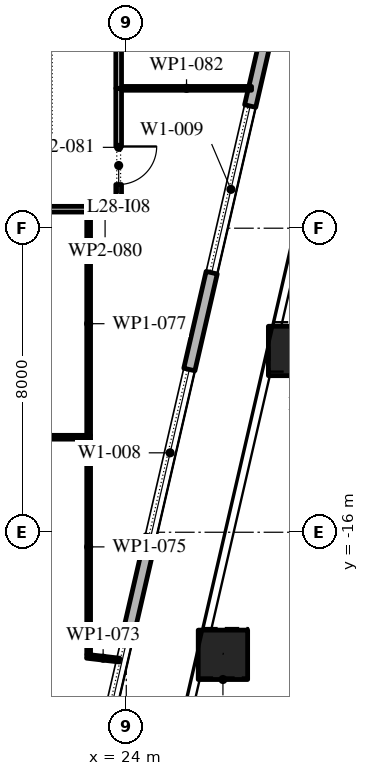
"""IFC4 building model, lengths in metres.
Left out: names, types, materials, properties, quantities, classifications, styles, units other than length and angle.
Written with IfcOpenShell. Run it as: python <this file> out.ifc"""

import sys

from ifc_helpers import new_model, si_unit, direction, frame, frame_2d, origin, origin_2d, place, context, subcontext, project, spatial, rectangle, extrude, element, fill, save


model = new_model("IFC4")
c1 = context("Model", 3, precision=1e-05, world=origin(), true_north=direction((0.0, 1.0)))
c2 = subcontext(c1, "Body", "Model", "MODEL_VIEW")
j1 = project(units=[si_unit("LENGTHUNIT", "METRE"), si_unit("PLANEANGLEUNIT", "RADIAN")], contexts=[c1])
p1 = place(None, origin())
s1 = spatial("IfcSite", under=j1, at=p1, CompositionType="ELEMENT")
p2 = place(p1, origin())
s2 = spatial("IfcBuilding", under=s1, at=p2, CompositionType="ELEMENT")
p3 = place(p2, frame((0.0, 0.0, 130.8)))
s3 = spatial("IfcBuildingStorey", under=s2, at=p3, CompositionType="ELEMENT", Elevation=130.8)
p4 = place(p3, frame((26.543, -19.225, 0.0), z_axis=(0.002906226325, 0.012613022249, 0.99991622925), x_axis=(-0.974466825284, 0.224531526563, 0.0)))
e1 = element("IfcColumn", 1, at=p4, inside=s3, PredefinedType="COLUMN", context=c2, shape_type="SweptSolid", body=[
    extrude(rectangle(XDim=1.3, YDim=1.3, at=origin_2d()), origin(), (0.0, 0.0, 1.0), 4.2),
])
p5 = place(p3, frame((28.389, -11.23, 0.0), z_axis=(0.005869083212, 0.025335844359, 0.999661767226), x_axis=(-0.974202561131, 0.225675363932, 0.0)))
e2 = element("IfcColumn", 2, at=p5, inside=s3, PredefinedType="COLUMN", context=c2, shape_type="SweptSolid", body=[
    extrude(rectangle(XDim=1.3, YDim=1.3, at=origin_2d()), origin(), (0.0, 0.0, 1.0), 4.201),
])
p6 = place(p3, frame((22.82, -24.016, 0.0), z_axis=(0.0, 0.0, 1.0), x_axis=(0.224953880882, 0.974369412223, 0.0)))
e3 = element("IfcWall", 3, at=p6, inside=s3, PredefinedType="STANDARD", context=c2, shape_type="SweptSolid", body=[
    extrude(rectangle(XDim=49.5, YDim=0.3, at=frame_2d((24.75, 0.0))), origin(), (0.0, 0.0, 1.0), 4.0),
])
p7 = place(p6, frame((1.157, 0.0, 0.45)))
e4 = element("IfcOpeningElement", 4, at=p7, cuts=e3, PredefinedType="OPENING", context=c2, shape_type="SweptSolid", body=[
    extrude(rectangle(XDim=4.5, YDim=3.05, at=frame_2d((2.25, 1.525))), frame((0.0, 0.16, 0.0), z_axis=(0.0, -1.0, 0.0), x_axis=(1.0, 0.0, 0.0)), (0.0, 0.0, 1.0), 0.32),
])
p8 = place(p6, frame((8.121, 0.0, 0.45)))
e5 = element("IfcOpeningElement", 5, at=p8, cuts=e3, PredefinedType="OPENING", context=c2, shape_type="SweptSolid", body=[
    extrude(rectangle(XDim=4.5, YDim=3.05, at=frame_2d((2.25, 1.525))), frame((0.0, 0.16, 0.0), z_axis=(0.0, -1.0, 0.0), x_axis=(1.0, 0.0, 0.0)), (0.0, 0.0, 1.0), 0.32),
])
p9 = place(p6, frame((15.236, 0.0, 0.45)))
e6 = element("IfcOpeningElement", 6, at=p9, cuts=e3, PredefinedType="OPENING", context=c2, shape_type="SweptSolid", body=[
    extrude(rectangle(XDim=4.5, YDim=3.05, at=frame_2d((2.25, 1.525))), frame((0.0, 0.16, 0.0), z_axis=(0.0, -1.0, 0.0), x_axis=(1.0, 0.0, 0.0)), (0.0, 0.0, 1.0), 0.32),
])
p10 = place(p6, frame((23.4, 0.0, 0.0)))
e7 = element("IfcOpeningElement", 7, at=p10, cuts=e3, PredefinedType="OPENING", context=c2, shape_type="SweptSolid", body=[
    extrude(rectangle(XDim=2.4, YDim=3.5, at=frame_2d((1.2, 1.75))), frame((0.0, 0.16, 0.0), z_axis=(0.0, -1.0, 0.0), x_axis=(1.0, 0.0, 0.0)), (0.0, 0.0, 1.0), 0.32),
])
p11 = place(p6, frame((29.464, 0.0, 0.45)))
e8 = element("IfcOpeningElement", 8, at=p11, cuts=e3, PredefinedType="OPENING", context=c2, shape_type="SweptSolid", body=[
    extrude(rectangle(XDim=4.5, YDim=2.875, at=frame_2d((2.25, 1.438))), frame((0.0, 0.16, 0.0), z_axis=(0.0, -1.0, 0.0), x_axis=(1.0, 0.0, 0.0)), (0.0, 0.0, 1.0), 0.32),
])
p12 = place(p6, frame((36.579, 0.0, 0.45)))
e9 = element("IfcOpeningElement", 9, at=p12, cuts=e3, PredefinedType="OPENING", context=c2, shape_type="SweptSolid", body=[
    extrude(rectangle(XDim=4.5, YDim=2.825, at=frame_2d((2.25, 1.413))), frame((0.0, 0.16, 0.0), z_axis=(0.0, -1.0, 0.0), x_axis=(1.0, 0.0, 0.0)), (0.0, 0.0, 1.0), 0.32),
])
p13 = place(p6, frame((43.693, 0.0, 0.45)))
e10 = element("IfcOpeningElement", 10, at=p13, cuts=e3, PredefinedType="OPENING", context=c2, shape_type="SweptSolid", body=[
    extrude(rectangle(XDim=4.5, YDim=2.75, at=frame_2d((2.25, 1.375))), frame((0.0, 0.16, 0.0), z_axis=(0.0, -1.0, 0.0), x_axis=(1.0, 0.0, 0.0)), (0.0, 0.0, 1.0), 0.32),
])
p14 = place(p3, frame((22.96, -19.264, 0.0), z_axis=(0.0, 0.0, 1.0), x_axis=(0.993326131588, -0.115339482852, 0.0)))
e11 = element("IfcWall", 11, at=p14, inside=s3, PredefinedType="PARTITIONING", context=c2, shape_type="SweptSolid", body=[
    extrude(rectangle(XDim=0.868, YDim=0.1, at=frame_2d((0.434, 0.0))), origin(), (0.0, 0.0, 1.0), 4.0),
])
p15 = place(p3, frame((23.06, -13.5, 0.0), z_axis=(0.0, 0.0, 1.0), x_axis=(-1.0, 0.0, 0.0)))
e12 = element("IfcWall", 12, at=p15, inside=s3, PredefinedType="PARTITIONING", context=c2, shape_type="SweptSolid", body=[
    extrude(rectangle(XDim=8.34, YDim=0.1, at=frame_2d((4.17, 0.0))), origin(), (0.0, 0.0, 1.0), 4.0),
])
p16 = place(p15, frame((2.04, 0.0, 0.0)))
e13 = element("IfcOpeningElement", 13, at=p16, cuts=e12, PredefinedType="OPENING", context=c2, shape_type="SweptSolid", body=[
    extrude(rectangle(XDim=0.9, YDim=2.1, at=frame_2d((0.45, 1.05))), frame((0.0, 0.06, 0.0), z_axis=(0.0, -1.0, 0.0), x_axis=(1.0, 0.0, 0.0)), (0.0, 0.0, 1.0), 0.12),
])
p17 = place(p3, frame((23.01, -13.55, 0.0), z_axis=(0.0, 0.0, 1.0), x_axis=(0.0, -1.0, 0.0)))
e14 = element("IfcWall", 14, at=p17, inside=s3, PredefinedType="PARTITIONING", context=c2, shape_type="SweptSolid", body=[
    extrude(rectangle(XDim=5.67, YDim=0.1, at=frame_2d((2.835, 0.0))), origin(), (0.0, 0.0, 1.0), 4.0),
])
p18 = place(p3, frame((23.06, -7.5, 0.0), z_axis=(0.0, 0.0, 1.0), x_axis=(-1.0, 0.0, 0.0)))
e15 = element("IfcWall", 15, at=p18, inside=s3, PredefinedType="PARTITIONING", context=c2, shape_type="SweptSolid", body=[
    extrude(rectangle(XDim=8.39, YDim=0.15, at=frame_2d((4.195, 0.0))), origin(), (0.0, 0.0, 1.0), 4.0),
])
p19 = place(p18, frame((1.99, 0.0, 0.0)))
e16 = element("IfcOpeningElement", 16, at=p19, cuts=e15, PredefinedType="OPENING", context=c2, shape_type="SweptSolid", body=[
    extrude(rectangle(XDim=1.0, YDim=2.1, at=frame_2d((0.5, 1.05))), frame((0.0, 0.085, 0.0), z_axis=(0.0, -1.0, 0.0), x_axis=(1.0, 0.0, 0.0)), (0.0, 0.0, 1.0), 0.17),
])
p20 = place(p3, frame((23.01, -7.575, 0.0), z_axis=(0.0, 0.0, 1.0), x_axis=(0.0, -1.0, 0.0)))
e17 = element("IfcWall", 17, at=p20, inside=s3, PredefinedType="PARTITIONING", context=c2, shape_type="SweptSolid", body=[
    extrude(rectangle(XDim=5.875, YDim=0.1, at=frame_2d((2.938, 0.0))), origin(), (0.0, 0.0, 1.0), 4.0),
])
p21 = place(p3, frame((23.875, -7.5, 0.0), z_axis=(0.0, 0.0, 1.0), x_axis=(-1.0, 0.0, 0.0)))
e18 = element("IfcWall", 18, at=p21, inside=s3, PredefinedType="PARTITIONING", context=c2, shape_type="SweptSolid", body=[
    extrude(rectangle(XDim=0.865, YDim=0.15, at=frame_2d((0.433, 0.0))), origin(), (0.0, 0.0, 1.0), 4.0),
])
p22 = place(p3, frame((23.8, -4.32, 0.0), z_axis=(0.0, 0.0, 1.0), x_axis=(0.0, -1.0, 0.0)))
e19 = element("IfcWall", 19, at=p22, inside=s3, PredefinedType="PARTITIONING", context=c2, shape_type="SweptSolid", body=[
    extrude(rectangle(XDim=3.105, YDim=0.15, at=frame_2d((1.552, 0.0))), origin(), (0.0, 0.0, 1.0), 4.0),
])
p23 = place(p22, frame((1.53, 0.0, 0.0)))
e20 = element("IfcOpeningElement", 20, at=p23, cuts=e19, PredefinedType="OPENING", context=c2, shape_type="SweptSolid", body=[
    extrude(rectangle(XDim=1.0, YDim=2.1, at=frame_2d((0.5, 1.05))), frame((0.0, 0.085, 0.0), z_axis=(0.0, -1.0, 0.0), x_axis=(1.0, 0.0, 0.0)), (0.0, 0.0, 1.0), 0.17),
])
p24 = place(p3, frame((23.875, -4.32, 0.0), z_axis=(0.0, 0.0, 1.0), x_axis=(1.0, 0.0, 0.0)))
e21 = element("IfcWall", 21, at=p24, inside=s3, PredefinedType="PARTITIONING", context=c2, shape_type="SweptSolid", body=[
    extrude(rectangle(XDim=3.421, YDim=0.1, at=frame_2d((1.71, 0.0))), origin(), (0.0, 0.0, 1.0), 4.0),
])
p25 = place(p3, frame((23.8, 10.44, 0.0), z_axis=(0.0, 0.0, 1.0), x_axis=(0.0, -1.0, 0.0)))
e22 = element("IfcWall", 22, at=p25, inside=s3, PredefinedType="PARTITIONING", context=c2, shape_type="SweptSolid", body=[
    extrude(rectangle(XDim=14.76, YDim=0.15, at=frame_2d((7.38, 0.0))), origin(), (0.0, 0.0, 1.0), 4.0),
])
p26 = place(p25, frame((9.86, 0.0, 0.0)))
e23 = element("IfcOpeningElement", 23, at=p26, cuts=e22, PredefinedType="OPENING", context=c2, shape_type="SweptSolid", body=[
    extrude(rectangle(XDim=1.0, YDim=2.1, at=frame_2d((0.5, 1.05))), frame((0.0, 0.085, 0.0), z_axis=(0.0, -1.0, 0.0), x_axis=(1.0, 0.0, 0.0)), (0.0, 0.0, 1.0), 0.17),
])
p27 = place(p7, origin())
e24 = element("IfcWindow", 24, at=p27, inside=s3, PartitioningType="DOUBLE_PANEL_VERTICAL", PredefinedType="WINDOW", context=c2, shape_type="SweptSolid", body=[
    extrude(rectangle(XDim=4.5, YDim=3.05, at=frame_2d((2.25, 1.525))), frame((0.0, 0.03, 0.0), z_axis=(0.0, -1.0, 0.0), x_axis=(1.0, 0.0, 0.0)), (0.0, 0.0, 1.0), 0.06),
])
fill(e4, e24)
p28 = place(p8, origin())
e25 = element("IfcWindow", 25, at=p28, inside=s3, PartitioningType="DOUBLE_PANEL_VERTICAL", PredefinedType="WINDOW", context=c2, shape_type="SweptSolid", body=[
    extrude(rectangle(XDim=4.5, YDim=3.05, at=frame_2d((2.25, 1.525))), frame((0.0, 0.03, 0.0), z_axis=(0.0, -1.0, 0.0), x_axis=(1.0, 0.0, 0.0)), (0.0, 0.0, 1.0), 0.06),
])
fill(e5, e25)
p29 = place(p9, origin())
e26 = element("IfcWindow", 26, at=p29, inside=s3, PartitioningType="DOUBLE_PANEL_VERTICAL", PredefinedType="WINDOW", context=c2, shape_type="SweptSolid", body=[
    extrude(rectangle(XDim=4.5, YDim=3.05, at=frame_2d((2.25, 1.525))), frame((0.0, 0.03, 0.0), z_axis=(0.0, -1.0, 0.0), x_axis=(1.0, 0.0, 0.0)), (0.0, 0.0, 1.0), 0.06),
])
fill(e6, e26)
p30 = place(p23, origin())
e27 = element("IfcDoor", 27, at=p30, inside=s3, OperationType="SINGLE_SWING_RIGHT", PredefinedType="DOOR", context=c2, shape_type="SweptSolid", body=[
    extrude(rectangle(XDim=1.0, YDim=2.1, at=frame_2d((0.5, 1.05))), frame((0.0, 0.025, 0.0), z_axis=(0.0, -1.0, 0.0), x_axis=(1.0, 0.0, 0.0)), (0.0, 0.0, 1.0), 0.05),
])
fill(e20, e27)
save(model, sys.argv[1])
